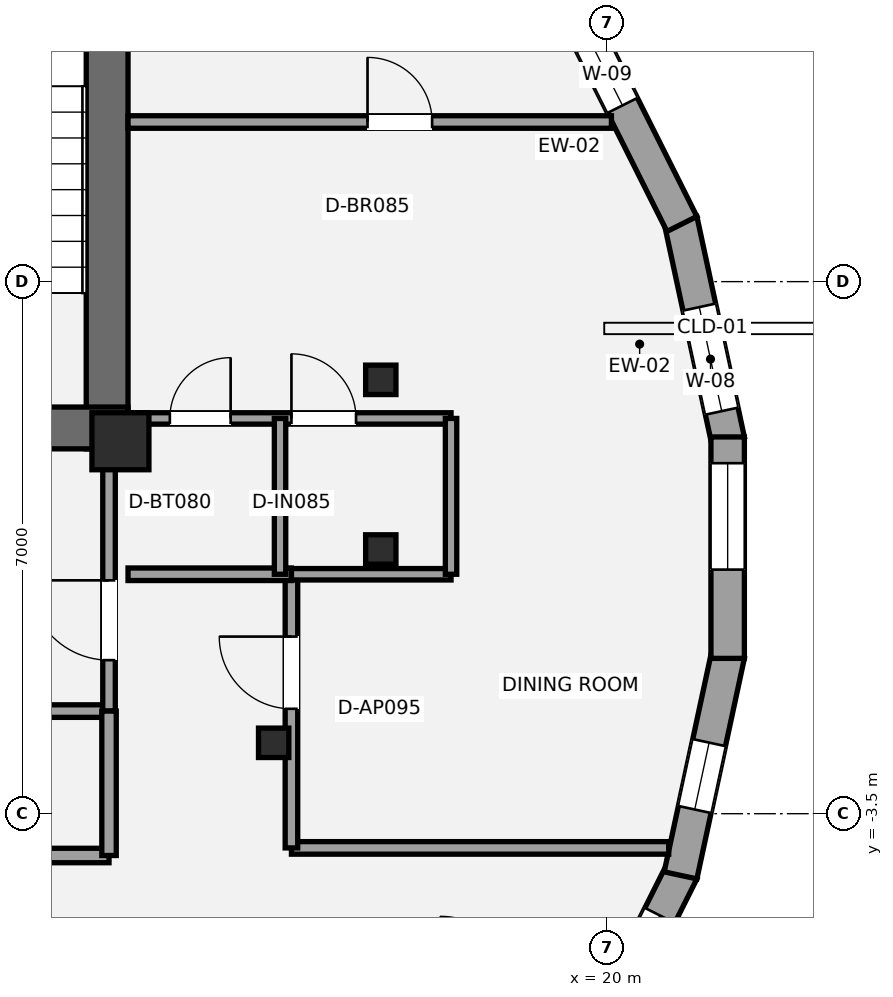
"""IFC4 building model, lengths in metres.
Left out: names, types, materials, properties, quantities, classifications, styles, units other than length and angle.
Written with IfcOpenShell. Run it as: python <this file> out.ifc"""

import sys

from ifc_helpers import new_model, si_unit, direction, frame, frame_2d, origin, origin_2d, place, context, subcontext, project, spatial, rectangle, i_section, extrude, element, fill, save


model = new_model("IFC4")
c1 = context("Model", 3, precision=1e-05, world=origin(), true_north=direction((0.0, 1.0)))
c2 = subcontext(c1, "Body", "Model", "MODEL_VIEW")
j1 = project(units=[si_unit("LENGTHUNIT", "METRE"), si_unit("PLANEANGLEUNIT", "RADIAN")], contexts=[c1])
p1 = place(None, origin())
s1 = spatial("IfcSite", under=j1, at=p1, CompositionType="ELEMENT")
p2 = place(p1, origin())
s2 = spatial("IfcBuilding", under=s1, at=p2, CompositionType="ELEMENT")
p3 = place(p2, frame((0.0, 0.0, 241.5)))
s3 = spatial("IfcBuildingStorey", under=s2, at=p3, CompositionType="ELEMENT", Elevation=241.5)
p4 = place(p3, frame((13.425, 1.3, 0.0), z_axis=(0.0, 0.0, 1.0), x_axis=(0.0, 1.0, 0.0)))
e1 = element("IfcWall", 1, at=p4, inside=s3, PredefinedType="SHEAR", context=c2, shape_type="SweptSolid", body=[
    extrude(rectangle(XDim=8.25, YDim=0.55, at=frame_2d((4.125, 0.0))), origin(), (0.0, 0.0, 1.0), 3.15),
])
p5 = place(p3, frame((13.7, 1.575, 0.0), z_axis=(0.0, 0.0, 1.0), x_axis=(-1.0, 0.0, 0.0)))
e2 = element("IfcWall", 2, at=p5, inside=s3, PredefinedType="SHEAR", context=c2, shape_type="SweptSolid", body=[
    extrude(rectangle(XDim=8.775, YDim=0.55, at=frame_2d((4.387, 0.0))), origin(), (0.0, 0.0, 1.0), 3.15),
])
p6 = place(p5, frame((2.35, 0.0, 0.0)))
e3 = element("IfcOpeningElement", 3, at=p6, cuts=e2, PredefinedType="OPENING", context=c2, shape_type="SweptSolid", body=[
    extrude(rectangle(XDim=1.05, YDim=2.15, at=frame_2d((0.525, 1.075))), frame((0.0, 0.285, 0.0), z_axis=(0.0, -1.0, 0.0), x_axis=(1.0, 0.0, 0.0)), (0.0, 0.0, 1.0), 0.57),
])
p7 = place(p5, frame((4.35, 0.0, 0.0)))
e4 = element("IfcOpeningElement", 4, at=p7, cuts=e2, PredefinedType="OPENING", context=c2, shape_type="SweptSolid", body=[
    extrude(rectangle(XDim=1.1, YDim=2.2, at=frame_2d((0.55, 1.1))), frame((0.0, 0.285, 0.0), z_axis=(0.0, -1.0, 0.0), x_axis=(1.0, 0.0, 0.0)), (0.0, 0.0, 1.0), 0.57),
])
p8 = place(p3, frame((13.6, 1.4, 0.0), z_axis=(0.0, 0.0, 1.0), x_axis=(1.0, 0.0, 0.0)))
e5 = element("IfcColumn", 5, at=p8, inside=s3, PredefinedType="PILASTER", context=c2, shape_type="SweptSolid", body=[
    extrude(rectangle(XDim=0.75, YDim=0.75, at=origin_2d()), origin(), (0.0, 0.0, 1.0), 3.15),
])
for number, where, z_axis, x_axis in (
    (6, (17.026, 2.208, 0.0), (0.0, 0.0, 1.0), (1.0, 0.0, 0.0)),
    (7, (15.616, -2.567, 0.0), (0.0, 0.0, 1.0), (1.0, 0.0, 0.0)),
    (8, (17.026, -0.024, 0.0), (0.0, 0.0, 1.0), (1.0, 0.0, 0.0)),
):
    element("IfcColumn", number, at=place(p3, frame(where, z_axis=z_axis, x_axis=x_axis)), inside=s3, PredefinedType="COLUMN", context=c2, shape_type="SweptSolid", body=[
        extrude(i_section(OverallWidth=0.399, OverallDepth=0.387, WebThickness=0.021, FlangeThickness=0.033, at=origin_2d()), origin(), (0.0, 0.0, 1.0), 3.15),
    ])
p9 = place(p3, frame((20.969, 4.311, 0.0), z_axis=(0.0, 0.0, 1.0), x_axis=(0.210540350534, -0.977585168053, 0.0)))
e9 = element("IfcWall", 9, at=p9, inside=s3, PredefinedType="STANDARD", context=c2, shape_type="SweptSolid", body=[
    extrude(rectangle(XDim=2.967, YDim=0.44, at=frame_2d((1.484, 0.0))), origin(), (0.0, 0.0, 1.0), 2.336),
])
p10 = place(p9, frame((1.173, 0.0, 0.55)))
e10 = element("IfcOpeningElement", 10, at=p10, cuts=e9, PredefinedType="OPENING", context=c2, shape_type="SweptSolid", body=[
    extrude(rectangle(XDim=1.4, YDim=1.55, at=frame_2d((0.7, 0.775))), frame((0.0, 0.23, 0.0), z_axis=(0.0, -1.0, 0.0), x_axis=(1.0, 0.0, 0.0)), (0.0, 0.0, 1.0), 0.46),
])
p11 = place(p3, frame((19.578, 7.069, 0.0), z_axis=(0.0, 0.0, 1.0), x_axis=(0.448424724145, -0.893820601002, 0.0)))
e11 = element("IfcWall", 11, at=p11, inside=s3, PredefinedType="STANDARD", context=c2, shape_type="SweptSolid", body=[
    extrude(rectangle(XDim=3.144, YDim=0.44, at=frame_2d((1.572, 0.0))), origin(), (0.0, 0.0, 1.0), 2.336),
])
p12 = place(p11, frame((0.499, 0.0, 0.58)))
e12 = element("IfcOpeningElement", 12, at=p12, cuts=e11, PredefinedType="OPENING", context=c2, shape_type="SweptSolid", body=[
    extrude(rectangle(XDim=0.9, YDim=1.35, at=frame_2d((0.45, 0.675))), frame((0.0, 0.23, 0.0), z_axis=(0.0, -1.0, 0.0), x_axis=(1.0, 0.0, 0.0)), (0.0, 0.0, 1.0), 0.46),
])
p13 = place(p3, frame((20.988, -4.259, 0.0), z_axis=(0.0, 0.0, 1.0), x_axis=(-0.448424724145, -0.893820601002, 0.0)))
e13 = element("IfcWall", 13, at=p13, inside=s3, PredefinedType="STANDARD", context=c2, shape_type="SweptSolid", body=[
    extrude(rectangle(XDim=3.144, YDim=0.44, at=frame_2d((1.572, 0.0))), origin(), (0.0, 0.0, 1.0), 2.336),
])
p14 = place(p13, frame((0.648, 0.0, 0.58)))
e14 = element("IfcOpeningElement", 14, at=p14, cuts=e13, PredefinedType="OPENING", context=c2, shape_type="SweptSolid", body=[
    extrude(rectangle(XDim=0.9, YDim=1.35, at=frame_2d((0.45, 0.675))), frame((0.0, 0.23, 0.0), z_axis=(0.0, -1.0, 0.0), x_axis=(1.0, 0.0, 0.0)), (0.0, 0.0, 1.0), 0.46),
])
p15 = place(p3, frame((21.594, -1.41, 0.0), z_axis=(0.0, 0.0, 1.0), x_axis=(-0.210540350534, -0.977585168053, 0.0)))
e15 = element("IfcWall", 15, at=p15, inside=s3, PredefinedType="STANDARD", context=c2, shape_type="SweptSolid", body=[
    extrude(rectangle(XDim=2.967, YDim=0.44, at=frame_2d((1.484, 0.0))), origin(), (0.0, 0.0, 1.0), 2.336),
])
p16 = place(p15, frame((1.181, 0.0, 0.58)))
e16 = element("IfcOpeningElement", 16, at=p16, cuts=e15, PredefinedType="OPENING", context=c2, shape_type="SweptSolid", body=[
    extrude(rectangle(XDim=0.9, YDim=1.35, at=frame_2d((0.45, 0.675))), frame((0.0, 0.23, 0.0), z_axis=(0.0, -1.0, 0.0), x_axis=(1.0, 0.0, 0.0)), (0.0, 0.0, 1.0), 0.46),
])
p17 = place(p3, frame((21.589, 1.457, 0.0), z_axis=(0.0, 0.0, 1.0), x_axis=(0.0, -1.0, 0.0)))
e17 = element("IfcWall", 17, at=p17, inside=s3, PredefinedType="STANDARD", context=c2, shape_type="SweptSolid", body=[
    extrude(rectangle(XDim=2.913, YDim=0.44, at=frame_2d((1.457, 0.0))), origin(), (0.0, 0.0, 1.0), 2.336),
])
p18 = place(p17, frame((0.345, 0.0, 0.58)))
e18 = element("IfcOpeningElement", 18, at=p18, cuts=e17, PredefinedType="OPENING", context=c2, shape_type="SweptSolid", body=[
    extrude(rectangle(XDim=1.4, YDim=1.55, at=frame_2d((0.7, 0.775))), frame((0.0, 0.23, 0.0), z_axis=(0.0, -1.0, 0.0), x_axis=(1.0, 0.0, 0.0)), (0.0, 0.0, 1.0), 0.46),
])
p19 = place(p3, frame((7.2, -2.15, 0.0), z_axis=(0.0, 0.0, 1.0), x_axis=(1.0, 0.0, 0.0)))
e19 = element("IfcWall", 19, at=p19, inside=s3, PredefinedType="PARTITIONING", context=c2, shape_type="SweptSolid", body=[
    extrude(rectangle(XDim=6.25, YDim=0.165, at=frame_2d((3.125, 0.0))), origin(), (0.0, 0.0, 1.0), 2.97),
])
p20 = place(p3, frame((13.45, -2.15, 0.0), z_axis=(0.0, 0.0, 1.0), x_axis=(0.0, 1.0, 0.0)))
e20 = element("IfcWall", 20, at=p20, inside=s3, PredefinedType="PARTITIONING", context=c2, shape_type="SweptSolid", body=[
    extrude(rectangle(XDim=3.5, YDim=0.165, at=frame_2d((1.75, 0.0))), origin(), (0.0, 0.0, 1.0), 2.423),
])
p21 = place(p20, frame((0.67, 0.0, 0.0)))
e21 = element("IfcOpeningElement", 21, at=p21, cuts=e20, PredefinedType="OPENING", context=c2, shape_type="SweptSolid", body=[
    extrude(rectangle(XDim=1.05, YDim=2.15, at=frame_2d((0.525, 1.075))), frame((0.0, 0.093, 0.0), z_axis=(0.0, -1.0, 0.0), x_axis=(1.0, 0.0, 0.0)), (0.0, 0.0, 1.0), 0.185),
])
p22 = place(p3, frame((2.1, -4.05, 0.0), z_axis=(0.0, 0.0, 1.0), x_axis=(1.0, 0.0, 0.0)))
e22 = element("IfcWall", 22, at=p22, inside=s3, PredefinedType="PLUMBINGWALL", context=c2, shape_type="SweptSolid", body=[
    extrude(rectangle(XDim=11.35, YDim=0.19, at=frame_2d((5.675, 0.0))), origin(), (0.0, 0.0, 1.0), 2.357),
])
p23 = place(p22, frame((1.4, 0.0, 0.0)))
e23 = element("IfcOpeningElement", 23, at=p23, cuts=e22, PredefinedType="OPENING", context=c2, shape_type="SweptSolid", body=[
    extrude(rectangle(XDim=0.9, YDim=2.1, at=frame_2d((0.45, 1.05))), frame((0.0, 0.105, 0.0), z_axis=(0.0, -1.0, 0.0), x_axis=(1.0, 0.0, 0.0)), (0.0, 0.0, 1.0), 0.21),
])
p24 = place(p22, frame((5.3, 0.0, 0.0)))
e24 = element("IfcOpeningElement", 24, at=p24, cuts=e22, PredefinedType="OPENING", context=c2, shape_type="SweptSolid", body=[
    extrude(rectangle(XDim=0.9, YDim=2.1, at=frame_2d((0.45, 1.05))), frame((0.0, 0.105, 0.0), z_axis=(0.0, -1.0, 0.0), x_axis=(1.0, 0.0, 0.0)), (0.0, 0.0, 1.0), 0.21),
])
p25 = place(p22, frame((9.1, 0.0, 0.0)))
e25 = element("IfcOpeningElement", 25, at=p25, cuts=e22, PredefinedType="OPENING", context=c2, shape_type="SweptSolid", body=[
    extrude(rectangle(XDim=0.9, YDim=2.1, at=frame_2d((0.45, 1.05))), frame((0.0, 0.105, 0.0), z_axis=(0.0, -1.0, 0.0), x_axis=(1.0, 0.0, 0.0)), (0.0, 0.0, 1.0), 0.21),
])
p26 = place(p3, frame((13.45, -4.05, 0.0), z_axis=(0.0, 0.0, 1.0), x_axis=(0.0, 1.0, 0.0)))
e26 = element("IfcWall", 26, at=p26, inside=s3, PredefinedType="PLUMBINGWALL", context=c2, shape_type="SweptSolid", body=[
    extrude(rectangle(XDim=1.9, YDim=0.19, at=frame_2d((0.95, 0.0))), origin(), (0.0, 0.0, 1.0), 2.423),
])
p27 = place(p3, frame((15.85, -3.95, 0.0), z_axis=(0.0, 0.0, 1.0), x_axis=(1.0, 0.0, 0.0)))
e27 = element("IfcWall", 27, at=p27, inside=s3, PredefinedType="PARTITIONING", context=c2, shape_type="SweptSolid", body=[
    extrude(rectangle(XDim=4.964, YDim=0.165, at=frame_2d((2.482, 0.0))), origin(), (0.0, 0.0, 1.0), 2.423),
])
p28 = place(p3, frame((15.85, -3.95, 0.0), z_axis=(0.0, 0.0, 1.0), x_axis=(0.0, 1.0, 0.0)))
e28 = element("IfcWall", 28, at=p28, inside=s3, PredefinedType="PARTITIONING", context=c2, shape_type="SweptSolid", body=[
    extrude(rectangle(XDim=3.6, YDim=0.165, at=frame_2d((1.8, 0.0))), origin(), (0.0, 0.0, 1.0), 2.357),
])
p29 = place(p28, frame((1.83, 0.0, 0.0)))
e29 = element("IfcOpeningElement", 29, at=p29, cuts=e28, PredefinedType="OPENING", context=c2, shape_type="SweptSolid", body=[
    extrude(rectangle(XDim=0.95, YDim=2.15, at=frame_2d((0.475, 1.075))), frame((0.0, 0.093, 0.0), z_axis=(0.0, -1.0, 0.0), x_axis=(1.0, 0.0, 0.0)), (0.0, 0.0, 1.0), 0.185),
])
p30 = place(p3, frame((13.7, -0.35, 0.0), z_axis=(0.0, 0.0, 1.0), x_axis=(1.0, 0.0, 0.0)))
e30 = element("IfcWall", 30, at=p30, inside=s3, PredefinedType="PARTITIONING", context=c2, shape_type="SweptSolid", body=[
    extrude(rectangle(XDim=2.15, YDim=0.165, at=frame_2d((1.075, 0.0))), origin(), (0.0, 0.0, 1.0), 2.423),
])
p31 = place(p3, frame((13.7, 5.6, 0.0), z_axis=(0.0, 0.0, 1.0), x_axis=(1.0, 0.0, 0.0)))
e31 = element("IfcWall", 31, at=p31, inside=s3, PredefinedType="PARTITIONING", context=c2, shape_type="SweptSolid", body=[
    extrude(rectangle(XDim=6.36, YDim=0.165, at=frame_2d((3.18, 0.0))), origin(), (0.0, 0.0, 1.0), 2.423),
])
p32 = place(p31, frame((3.151, 0.0, 0.0)))
e32 = element("IfcOpeningElement", 32, at=p32, cuts=e31, PredefinedType="OPENING", context=c2, shape_type="SweptSolid", body=[
    extrude(rectangle(XDim=0.85, YDim=2.1, at=frame_2d((0.425, 1.05))), frame((0.0, 0.093, 0.0), z_axis=(0.0, -1.0, 0.0), x_axis=(1.0, 0.0, 0.0)), (0.0, 0.0, 1.0), 0.185),
])
p33 = place(p3, frame((13.7, 1.7, 0.0), z_axis=(0.0, 0.0, 1.0), x_axis=(1.0, 0.0, 0.0)))
e33 = element("IfcWall", 33, at=p33, inside=s3, PredefinedType="PLUMBINGWALL", context=c2, shape_type="SweptSolid", body=[
    extrude(rectangle(XDim=4.25, YDim=0.15, at=frame_2d((2.125, 0.0))), origin(), (0.0, 0.0, 1.0), 2.423),
])
p34 = place(p33, frame((0.55, 0.0, 0.0)))
e34 = element("IfcOpeningElement", 34, at=p34, cuts=e33, PredefinedType="OPENING", context=c2, shape_type="SweptSolid", body=[
    extrude(rectangle(XDim=0.8, YDim=2.1, at=frame_2d((0.4, 1.05))), frame((0.0, 0.085, 0.0), z_axis=(0.0, -1.0, 0.0), x_axis=(1.0, 0.0, 0.0)), (0.0, 0.0, 1.0), 0.17),
])
p35 = place(p33, frame((2.15, 0.0, 0.0)))
e35 = element("IfcOpeningElement", 35, at=p35, cuts=e33, PredefinedType="OPENING", context=c2, shape_type="SweptSolid", body=[
    extrude(rectangle(XDim=0.85, YDim=2.1, at=frame_2d((0.425, 1.05))), frame((0.0, 0.085, 0.0), z_axis=(0.0, -1.0, 0.0), x_axis=(1.0, 0.0, 0.0)), (0.0, 0.0, 1.0), 0.17),
])
p36 = place(p3, frame((15.85, -0.35, 0.0), z_axis=(0.0, 0.0, 1.0), x_axis=(1.0, 0.0, 0.0)))
e36 = element("IfcWall", 36, at=p36, inside=s3, PredefinedType="PLUMBINGWALL", context=c2, shape_type="SweptSolid", body=[
    extrude(rectangle(XDim=2.1, YDim=0.15, at=frame_2d((1.05, 0.0))), origin(), (0.0, 0.0, 1.0), 2.423),
])
for number, where, z_axis, x_axis in (
    (37, (15.7, -0.35, 0.0), (0.0, 0.0, 1.0), (0.0, 1.0, 0.0)),
    (38, (17.95, -0.35, 0.0), (0.0, 0.0, 1.0), (0.0, 1.0, 0.0)),
):
    element("IfcWall", number, at=place(p3, frame(where, z_axis=z_axis, x_axis=x_axis)), inside=s3, PredefinedType="PLUMBINGWALL", context=c2, shape_type="SweptSolid", body=[
        extrude(rectangle(XDim=2.05, YDim=0.15, at=frame_2d((1.025, 0.0))), origin(), (0.0, 0.0, 1.0), 2.97),
    ])
p37 = place(p10, origin())
e39 = element("IfcWindow", 39, at=p37, inside=s3, PartitioningType="SINGLE_PANEL", PredefinedType="WINDOW", context=c2, shape_type="SweptSolid", body=[
    extrude(rectangle(XDim=1.4, YDim=1.55, at=frame_2d((0.7, 0.775))), frame((0.0, -0.01, 0.0), z_axis=(0.0, -1.0, 0.0), x_axis=(1.0, 0.0, 0.0)), (0.0, 0.0, 1.0), 0.06),
])
fill(e10, e39)
p38 = place(p12, origin())
e40 = element("IfcWindow", 40, at=p38, inside=s3, PartitioningType="SINGLE_PANEL", PredefinedType="WINDOW", context=c2, shape_type="SweptSolid", body=[
    extrude(rectangle(XDim=0.9, YDim=1.35, at=frame_2d((0.45, 0.675))), frame((0.0, -0.01, 0.0), z_axis=(0.0, -1.0, 0.0), x_axis=(1.0, 0.0, 0.0)), (0.0, 0.0, 1.0), 0.06),
])
fill(e12, e40)
p39 = place(p14, origin())
e41 = element("IfcWindow", 41, at=p39, inside=s3, PartitioningType="SINGLE_PANEL", PredefinedType="WINDOW", context=c2, shape_type="SweptSolid", body=[
    extrude(rectangle(XDim=0.9, YDim=1.35, at=frame_2d((0.45, 0.675))), frame((0.0, -0.01, 0.0), z_axis=(0.0, -1.0, 0.0), x_axis=(1.0, 0.0, 0.0)), (0.0, 0.0, 1.0), 0.06),
])
fill(e14, e41)
p40 = place(p16, origin())
e42 = element("IfcWindow", 42, at=p40, inside=s3, PartitioningType="SINGLE_PANEL", PredefinedType="WINDOW", context=c2, shape_type="SweptSolid", body=[
    extrude(rectangle(XDim=0.9, YDim=1.35, at=frame_2d((0.45, 0.675))), frame((0.0, -0.01, 0.0), z_axis=(0.0, -1.0, 0.0), x_axis=(1.0, 0.0, 0.0)), (0.0, 0.0, 1.0), 0.06),
])
fill(e16, e42)
p41 = place(p18, origin())
e43 = element("IfcWindow", 43, at=p41, inside=s3, PartitioningType="SINGLE_PANEL", PredefinedType="WINDOW", context=c2, shape_type="SweptSolid", body=[
    extrude(rectangle(XDim=1.4, YDim=1.55, at=frame_2d((0.7, 0.775))), frame((0.0, -0.01, 0.0), z_axis=(0.0, -1.0, 0.0), x_axis=(1.0, 0.0, 0.0)), (0.0, 0.0, 1.0), 0.06),
])
fill(e18, e43)
p42 = place(p21, origin())
e44 = element("IfcDoor", 44, at=p42, inside=s3, OperationType="SINGLE_SWING_RIGHT", PredefinedType="DOOR", context=c2, shape_type="SweptSolid", body=[
    extrude(rectangle(XDim=1.05, YDim=2.15, at=frame_2d((0.525, 1.075))), frame((0.0, 0.025, 0.0), z_axis=(0.0, -1.0, 0.0), x_axis=(1.0, 0.0, 0.0)), (0.0, 0.0, 1.0), 0.05),
])
fill(e21, e44)
p43 = place(p29, origin())
e45 = element("IfcDoor", 45, at=p43, inside=s3, OperationType="SINGLE_SWING_RIGHT", PredefinedType="DOOR", context=c2, shape_type="SweptSolid", body=[
    extrude(rectangle(XDim=0.95, YDim=2.15, at=frame_2d((0.475, 1.075))), frame((0.0, 0.025, 0.0), z_axis=(0.0, -1.0, 0.0), x_axis=(1.0, 0.0, 0.0)), (0.0, 0.0, 1.0), 0.05),
])
fill(e29, e45)
p44 = place(p34, origin())
e46 = element("IfcDoor", 46, at=p44, inside=s3, OperationType="SINGLE_SWING_RIGHT", PredefinedType="DOOR", context=c2, shape_type="SweptSolid", body=[
    extrude(rectangle(XDim=0.8, YDim=2.1, at=frame_2d((0.4, 1.05))), frame((0.0, 0.025, 0.0), z_axis=(0.0, -1.0, 0.0), x_axis=(1.0, 0.0, 0.0)), (0.0, 0.0, 1.0), 0.05),
])
fill(e34, e46)
p45 = place(p35, origin())
e47 = element("IfcDoor", 47, at=p45, inside=s3, OperationType="SINGLE_SWING_LEFT", PredefinedType="DOOR", context=c2, shape_type="SweptSolid", body=[
    extrude(rectangle(XDim=0.85, YDim=2.1, at=frame_2d((0.425, 1.05))), frame((0.0, 0.025, 0.0), z_axis=(0.0, -1.0, 0.0), x_axis=(1.0, 0.0, 0.0)), (0.0, 0.0, 1.0), 0.05),
])
fill(e35, e47)
p46 = place(p32, origin())
e48 = element("IfcDoor", 48, at=p46, inside=s3, OperationType="SINGLE_SWING_LEFT", PredefinedType="DOOR", context=c2, shape_type="SweptSolid", body=[
    extrude(rectangle(XDim=0.85, YDim=2.1, at=frame_2d((0.425, 1.05))), frame((0.0, 0.025, 0.0), z_axis=(0.0, -1.0, 0.0), x_axis=(1.0, 0.0, 0.0)), (0.0, 0.0, 1.0), 0.05),
])
fill(e32, e48)
save(model, sys.argv[1])
